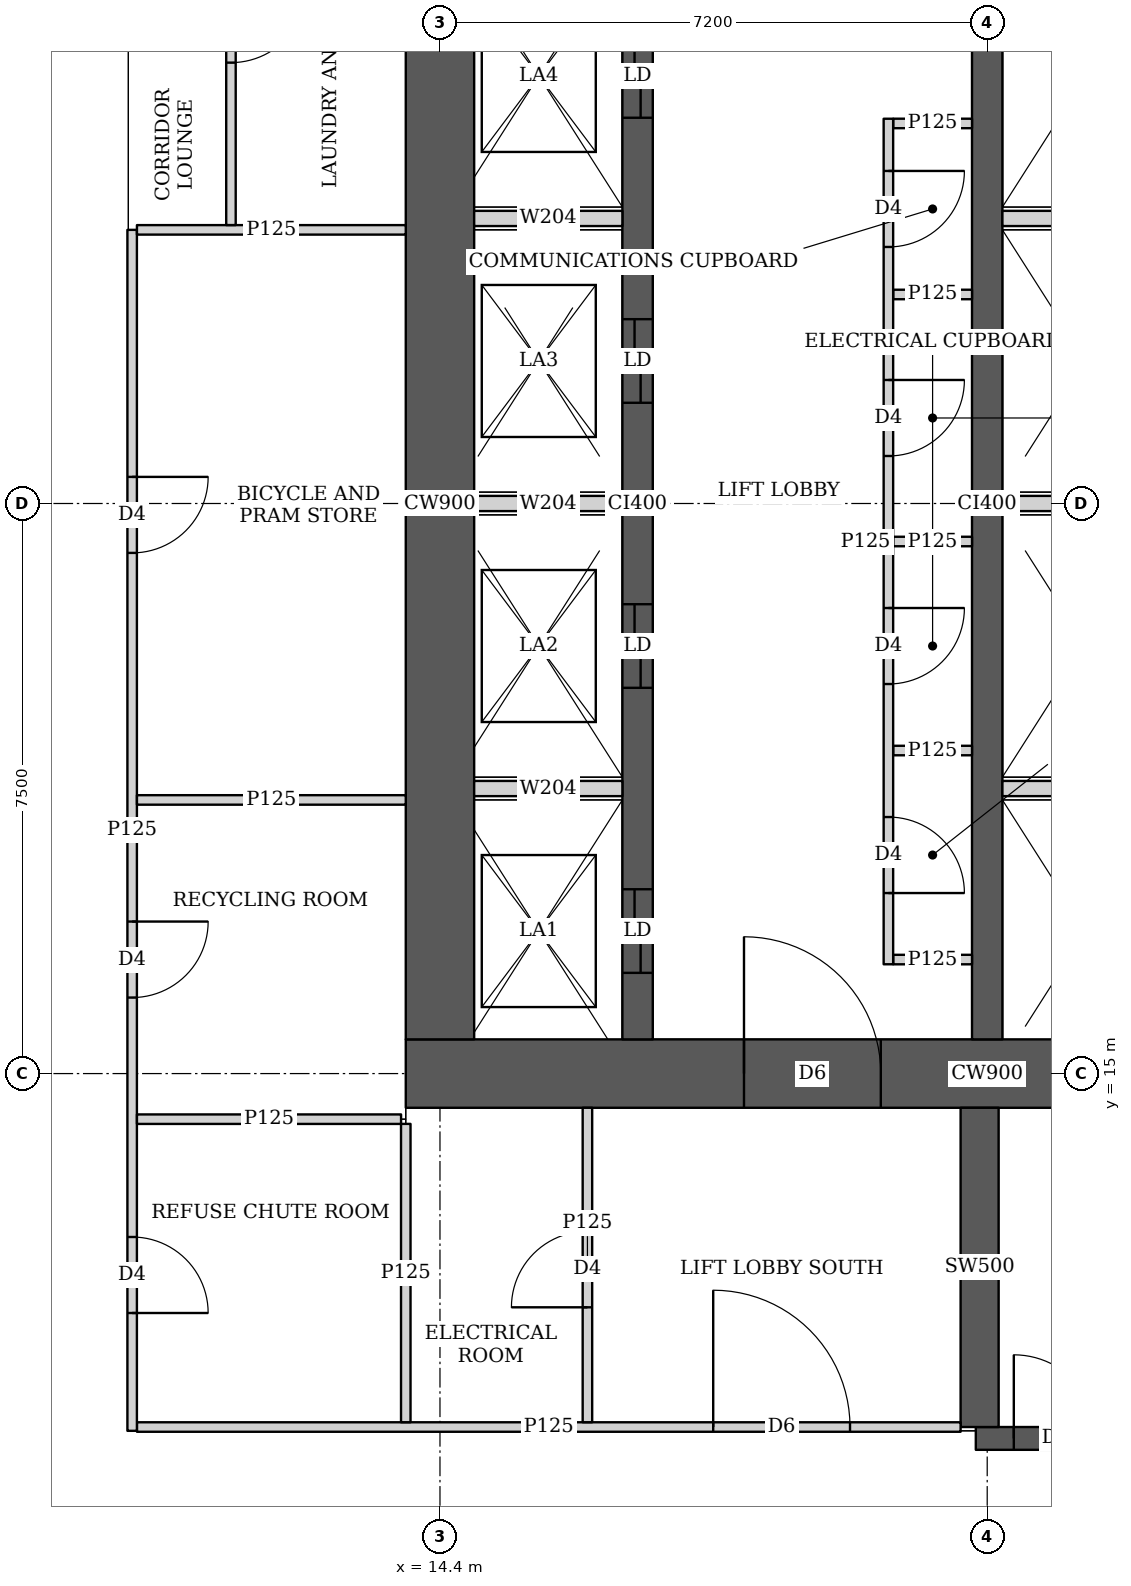
"""IFC4 building model, lengths in metres.
Left out: names, types, materials, properties, quantities, classifications, styles, units other than length and angle.
Written with IfcOpenShell. Run it as: python <this file> out.ifc"""

import sys

from ifc_helpers import new_model, si_unit, direction, frame, frame_2d, origin, place, context, subcontext, project, spatial, rectangle, extrude, element, fill, save


model = new_model("IFC4")
c1 = context("Model", 3, precision=1e-05, world=origin(), true_north=direction((0.0, 1.0)))
c2 = subcontext(c1, "Body", "Model", "MODEL_VIEW")
j1 = project(units=[si_unit("LENGTHUNIT", "METRE"), si_unit("PLANEANGLEUNIT", "RADIAN")], contexts=[c1])
p1 = place(None, origin())
s1 = spatial("IfcSite", under=j1, at=p1, CompositionType="ELEMENT")
p2 = place(p1, origin())
s2 = spatial("IfcBuilding", under=s1, at=p2, CompositionType="ELEMENT")
p3 = place(p2, frame((0.0, 0.0, 20.0)))
s3 = spatial("IfcBuildingStorey", under=s2, at=p3, CompositionType="ELEMENT", Elevation=20.0)
p4 = place(p3, frame((13.95, 15.0, 0.0), z_axis=(0.0, 0.0, 1.0), x_axis=(1.0, 0.0, 0.0)))
e1 = element("IfcWall", 1, at=p4, inside=s3, PredefinedType="SHEAR", context=c2, shape_type="SweptSolid", body=[
    extrude(rectangle(XDim=15.3, YDim=0.9, at=frame_2d((7.65, 0.0))), origin(), (0.0, 0.0, 1.0), 3.75),
])
p5 = place(p4, frame((4.45, 0.0, 0.0)))
e2 = element("IfcOpeningElement", 2, at=p5, cuts=e1, PredefinedType="OPENING", context=c2, shape_type="SweptSolid", body=[
    extrude(rectangle(XDim=1.8, YDim=2.1, at=frame_2d((0.9, 1.05))), frame((0.0, 0.46, 0.0), z_axis=(0.0, -1.0, 0.0), x_axis=(1.0, 0.0, 0.0)), (0.0, 0.0, 1.0), 0.92),
])
p6 = place(p4, frame((10.7, 0.0, 0.0)))
e3 = element("IfcOpeningElement", 3, at=p6, cuts=e1, PredefinedType="OPENING", context=c2, shape_type="SweptSolid", body=[
    extrude(rectangle(XDim=1.1, YDim=2.1, at=frame_2d((0.55, 1.05))), frame((0.0, 0.46, 0.0), z_axis=(0.0, -1.0, 0.0), x_axis=(1.0, 0.0, 0.0)), (0.0, 0.0, 1.0), 0.92),
])
p7 = place(p3, frame((14.4, 15.45, 0.0), z_axis=(0.0, 0.0, 1.0), x_axis=(0.0, 1.0, 0.0)))
e4 = element("IfcWall", 4, at=p7, inside=s3, PredefinedType="SHEAR", context=c2, shape_type="SweptSolid", body=[
    extrude(rectangle(XDim=14.1, YDim=0.9, at=frame_2d((7.05, 0.0))), origin(), (0.0, 0.0, 1.0), 3.75),
])
p8 = place(p3, frame((17.0, 15.45, 0.0), z_axis=(0.0, 0.0, 1.0), x_axis=(0.0, 1.0, 0.0)))
e5 = element("IfcWall", 5, at=p8, inside=s3, PredefinedType="SHEAR", context=c2, shape_type="SweptSolid", body=[
    extrude(rectangle(XDim=14.1, YDim=0.4, at=frame_2d((7.05, 0.0))), origin(), (0.0, 0.0, 1.0), 3.75),
])
p9 = place(p8, frame((0.875, 0.0, 0.0)))
e6 = element("IfcOpeningElement", 6, at=p9, cuts=e5, PredefinedType="OPENING", context=c2, shape_type="SweptSolid", body=[
    extrude(rectangle(XDim=1.1, YDim=2.1, at=frame_2d((0.55, 1.05))), frame((0.0, 0.21, 0.0), z_axis=(0.0, -1.0, 0.0), x_axis=(1.0, 0.0, 0.0)), (0.0, 0.0, 1.0), 0.42),
])
p10 = place(p8, frame((4.625, 0.0, 0.0)))
e7 = element("IfcOpeningElement", 7, at=p10, cuts=e5, PredefinedType="OPENING", context=c2, shape_type="SweptSolid", body=[
    extrude(rectangle(XDim=1.1, YDim=2.1, at=frame_2d((0.55, 1.05))), frame((0.0, 0.21, 0.0), z_axis=(0.0, -1.0, 0.0), x_axis=(1.0, 0.0, 0.0)), (0.0, 0.0, 1.0), 0.42),
])
p11 = place(p8, frame((8.375, 0.0, 0.0)))
e8 = element("IfcOpeningElement", 8, at=p11, cuts=e5, PredefinedType="OPENING", context=c2, shape_type="SweptSolid", body=[
    extrude(rectangle(XDim=1.1, YDim=2.1, at=frame_2d((0.55, 1.05))), frame((0.0, 0.21, 0.0), z_axis=(0.0, -1.0, 0.0), x_axis=(1.0, 0.0, 0.0)), (0.0, 0.0, 1.0), 0.42),
])
p12 = place(p8, frame((12.125, 0.0, 0.0)))
e9 = element("IfcOpeningElement", 9, at=p12, cuts=e5, PredefinedType="OPENING", context=c2, shape_type="SweptSolid", body=[
    extrude(rectangle(XDim=1.1, YDim=2.1, at=frame_2d((0.55, 1.05))), frame((0.0, 0.21, 0.0), z_axis=(0.0, -1.0, 0.0), x_axis=(1.0, 0.0, 0.0)), (0.0, 0.0, 1.0), 0.42),
])
p13 = place(p3, frame((21.6, 15.45, 0.0), z_axis=(0.0, 0.0, 1.0), x_axis=(0.0, 1.0, 0.0)))
e10 = element("IfcWall", 10, at=p13, inside=s3, PredefinedType="SHEAR", context=c2, shape_type="SweptSolid", body=[
    extrude(rectangle(XDim=14.1, YDim=0.4, at=frame_2d((7.05, 0.0))), origin(), (0.0, 0.0, 1.0), 3.75),
])
p14 = place(p3, frame((21.45, 10.2, 0.0), z_axis=(0.0, 0.0, 1.0), x_axis=(1.0, 0.0, 0.0)))
e11 = element("IfcWall", 11, at=p14, inside=s3, PredefinedType="SHEAR", context=c2, shape_type="SweptSolid", body=[
    extrude(rectangle(XDim=7.5, YDim=0.3, at=frame_2d((3.75, 0.0))), origin(), (0.0, 0.0, 1.0), 3.75),
])
p15 = place(p14, frame((0.5, 0.0, 0.0)))
e12 = element("IfcOpeningElement", 12, at=p15, cuts=e11, PredefinedType="OPENING", context=c2, shape_type="SweptSolid", body=[
    extrude(rectangle(XDim=1.1, YDim=2.1, at=frame_2d((0.55, 1.05))), frame((0.0, 0.16, 0.0), z_axis=(0.0, -1.0, 0.0), x_axis=(1.0, 0.0, 0.0)), (0.0, 0.0, 1.0), 0.32),
])
p16 = place(p3, frame((21.5, 10.35, 0.0), z_axis=(0.0, 0.0, 1.0), x_axis=(0.0, 1.0, 0.0)))
e13 = element("IfcWall", 13, at=p16, inside=s3, PredefinedType="SHEAR", context=c2, shape_type="SweptSolid", body=[
    extrude(rectangle(XDim=4.2, YDim=0.5, at=frame_2d((2.1, 0.0))), origin(), (0.0, 0.0, 1.0), 3.75),
])
p17 = place(p3, frame((10.35, 10.3, 0.0), z_axis=(0.0, 0.0, 1.0), x_axis=(0.0, 1.0, 0.0)))
e14 = element("IfcWall", 14, at=p17, inside=s3, PredefinedType="PARTITIONING", context=c2, shape_type="SweptSolid", body=[
    extrude(rectangle(XDim=15.8, YDim=0.125, at=frame_2d((7.9, 0.0))), origin(), (0.0, 0.0, 1.0), 3.5),
])
p18 = place(p17, frame((1.55, 0.0, 0.0)))
e15 = element("IfcOpeningElement", 15, at=p18, cuts=e14, PredefinedType="OPENING", context=c2, shape_type="SweptSolid", body=[
    extrude(rectangle(XDim=1.0, YDim=2.1, at=frame_2d((0.5, 1.05))), frame((0.0, 0.073, 0.0), z_axis=(0.0, -1.0, 0.0), x_axis=(1.0, 0.0, 0.0)), (0.0, 0.0, 1.0), 0.145),
])
p19 = place(p17, frame((5.7, 0.0, 0.0)))
e16 = element("IfcOpeningElement", 16, at=p19, cuts=e14, PredefinedType="OPENING", context=c2, shape_type="SweptSolid", body=[
    extrude(rectangle(XDim=1.0, YDim=2.1, at=frame_2d((0.5, 1.05))), frame((0.0, 0.073, 0.0), z_axis=(0.0, -1.0, 0.0), x_axis=(1.0, 0.0, 0.0)), (0.0, 0.0, 1.0), 0.145),
])
p20 = place(p17, frame((11.55, 0.0, 0.0)))
e17 = element("IfcOpeningElement", 17, at=p20, cuts=e14, PredefinedType="OPENING", context=c2, shape_type="SweptSolid", body=[
    extrude(rectangle(XDim=1.0, YDim=2.1, at=frame_2d((0.5, 1.05))), frame((0.0, 0.073, 0.0), z_axis=(0.0, -1.0, 0.0), x_axis=(1.0, 0.0, 0.0)), (0.0, 0.0, 1.0), 0.145),
])
p21 = place(p3, frame((11.65, 26.163, 0.0), z_axis=(0.0, 0.0, 1.0), x_axis=(0.0, 1.0, 0.0)))
e18 = element("IfcWall", 18, at=p21, inside=s3, PredefinedType="PARTITIONING", context=c2, shape_type="SweptSolid", body=[
    extrude(rectangle(XDim=5.275, YDim=0.125, at=frame_2d((2.637, 0.0))), origin(), (0.0, 0.0, 1.0), 3.5),
])
p22 = place(p21, frame((2.137, 0.0, 0.0)))
e19 = element("IfcOpeningElement", 19, at=p22, cuts=e18, PredefinedType="OPENING", context=c2, shape_type="SweptSolid", body=[
    extrude(rectangle(XDim=1.0, YDim=2.1, at=frame_2d((0.5, 1.05))), frame((0.0, 0.073, 0.0), z_axis=(0.0, -1.0, 0.0), x_axis=(1.0, 0.0, 0.0)), (0.0, 0.0, 1.0), 0.145),
])
p23 = place(p3, frame((10.413, 14.4, 0.0), z_axis=(0.0, 0.0, 1.0), x_axis=(1.0, 0.0, 0.0)))
e20 = element("IfcWall", 20, at=p23, inside=s3, PredefinedType="PARTITIONING", context=c2, shape_type="SweptSolid", body=[
    extrude(rectangle(XDim=3.475, YDim=0.125, at=frame_2d((1.737, 0.0))), origin(), (0.0, 0.0, 1.0), 3.5),
])
for number, where, z_axis, x_axis in (
    (21, (10.413, 18.6, 0.0), (0.0, 0.0, 1.0), (1.0, 0.0, 0.0)),
    (22, (10.413, 26.1, 0.0), (0.0, 0.0, 1.0), (1.0, 0.0, 0.0)),
):
    element("IfcWall", number, at=place(p3, frame(where, z_axis=z_axis, x_axis=x_axis)), inside=s3, PredefinedType="PARTITIONING", context=c2, shape_type="SweptSolid", body=[
        extrude(rectangle(XDim=3.537, YDim=0.125, at=frame_2d((1.769, 0.0))), origin(), (0.0, 0.0, 1.0), 3.5),
    ])
p24 = place(p3, frame((13.95, 10.413, 0.0), z_axis=(0.0, 0.0, 1.0), x_axis=(0.0, 1.0, 0.0)))
e23 = element("IfcWall", 23, at=p24, inside=s3, PredefinedType="PARTITIONING", context=c2, shape_type="SweptSolid", body=[
    extrude(rectangle(XDim=3.925, YDim=0.125, at=frame_2d((1.962, 0.0))), origin(), (0.0, 0.0, 1.0), 3.5),
])
p25 = place(p3, frame((10.413, 10.35, 0.0), z_axis=(0.0, 0.0, 1.0), x_axis=(1.0, 0.0, 0.0)))
e24 = element("IfcWall", 24, at=p25, inside=s3, PredefinedType="PARTITIONING", context=c2, shape_type="SweptSolid", body=[
    extrude(rectangle(XDim=10.837, YDim=0.125, at=frame_2d((5.418, 0.0))), origin(), (0.0, 0.0, 1.0), 3.5),
])
p26 = place(p25, frame((7.582, 0.0, 0.0)))
e25 = element("IfcOpeningElement", 25, at=p26, cuts=e24, PredefinedType="OPENING", context=c2, shape_type="SweptSolid", body=[
    extrude(rectangle(XDim=1.8, YDim=2.1, at=frame_2d((0.9, 1.05))), frame((0.0, 0.073, 0.0), z_axis=(0.0, -1.0, 0.0), x_axis=(1.0, 0.0, 0.0)), (0.0, 0.0, 1.0), 0.145),
])
p27 = place(p3, frame((16.34, 10.413, 0.0), z_axis=(0.0, 0.0, 1.0), x_axis=(0.0, 1.0, 0.0)))
e26 = element("IfcWall", 26, at=p27, inside=s3, PredefinedType="PARTITIONING", context=c2, shape_type="SweptSolid", body=[
    extrude(rectangle(XDim=4.137, YDim=0.125, at=frame_2d((2.068, 0.0))), origin(), (0.0, 0.0, 1.0), 3.5),
])
p28 = place(p27, frame((1.512, 0.0, 0.0)))
e27 = element("IfcOpeningElement", 27, at=p28, cuts=e26, PredefinedType="OPENING", context=c2, shape_type="SweptSolid", body=[
    extrude(rectangle(XDim=1.0, YDim=2.1, at=frame_2d((0.5, 1.05))), frame((0.0, 0.073, 0.0), z_axis=(0.0, -1.0, 0.0), x_axis=(1.0, 0.0, 0.0)), (0.0, 0.0, 1.0), 0.145),
])
p29 = place(p3, frame((20.3, 16.438, 0.0), z_axis=(0.0, 0.0, 1.0), x_axis=(0.0, 1.0, 0.0)))
e28 = element("IfcWall", 28, at=p29, inside=s3, PredefinedType="PARTITIONING", context=c2, shape_type="SweptSolid", body=[
    extrude(rectangle(XDim=11.124, YDim=0.125, at=frame_2d((5.562, 0.0))), origin(), (0.0, 0.0, 1.0), 3.5),
])
p30 = place(p29, frame((0.937, 0.0, 0.0)))
e29 = element("IfcOpeningElement", 29, at=p30, cuts=e28, PredefinedType="OPENING", context=c2, shape_type="SweptSolid", body=[
    extrude(rectangle(XDim=1.0, YDim=2.1, at=frame_2d((0.5, 1.05))), frame((0.0, 0.073, 0.0), z_axis=(0.0, -1.0, 0.0), x_axis=(1.0, 0.0, 0.0)), (0.0, 0.0, 1.0), 0.145),
])
p31 = place(p29, frame((3.687, 0.0, 0.0)))
e30 = element("IfcOpeningElement", 30, at=p31, cuts=e28, PredefinedType="OPENING", context=c2, shape_type="SweptSolid", body=[
    extrude(rectangle(XDim=1.0, YDim=2.1, at=frame_2d((0.5, 1.05))), frame((0.0, 0.073, 0.0), z_axis=(0.0, -1.0, 0.0), x_axis=(1.0, 0.0, 0.0)), (0.0, 0.0, 1.0), 0.145),
])
p32 = place(p29, frame((6.687, 0.0, 0.0)))
e31 = element("IfcOpeningElement", 31, at=p32, cuts=e28, PredefinedType="OPENING", context=c2, shape_type="SweptSolid", body=[
    extrude(rectangle(XDim=1.0, YDim=2.1, at=frame_2d((0.5, 1.05))), frame((0.0, 0.073, 0.0), z_axis=(0.0, -1.0, 0.0), x_axis=(1.0, 0.0, 0.0)), (0.0, 0.0, 1.0), 0.145),
])
p33 = place(p29, frame((9.437, 0.0, 0.0)))
e32 = element("IfcOpeningElement", 32, at=p33, cuts=e28, PredefinedType="OPENING", context=c2, shape_type="SweptSolid", body=[
    extrude(rectangle(XDim=1.0, YDim=2.1, at=frame_2d((0.5, 1.05))), frame((0.0, 0.073, 0.0), z_axis=(0.0, -1.0, 0.0), x_axis=(1.0, 0.0, 0.0)), (0.0, 0.0, 1.0), 0.145),
])
for number, where, z_axis, x_axis in (
    (33, (20.363, 16.5, 0.0), (0.0, 0.0, 1.0), (1.0, 0.0, 0.0)),
    (34, (20.363, 27.5, 0.0), (0.0, 0.0, 1.0), (1.0, 0.0, 0.0)),
    (35, (20.363, 19.25, 0.0), (0.0, 0.0, 1.0), (1.0, 0.0, 0.0)),
    (36, (20.363, 22.0, 0.0), (0.0, 0.0, 1.0), (1.0, 0.0, 0.0)),
    (37, (20.363, 25.25, 0.0), (0.0, 0.0, 1.0), (1.0, 0.0, 0.0)),
):
    element("IfcWall", number, at=place(p3, frame(where, z_axis=z_axis, x_axis=x_axis)), inside=s3, PredefinedType="PARTITIONING", context=c2, shape_type="SweptSolid", body=[
        extrude(rectangle(XDim=1.037, YDim=0.125, at=frame_2d((0.519, 0.0))), origin(), (0.0, 0.0, 1.0), 3.5),
    ])
p34 = place(p3, frame((14.85, 18.75, 0.0), z_axis=(0.0, 0.0, 1.0), x_axis=(1.0, 0.0, 0.0)))
e38 = element("IfcWall", 38, at=p34, inside=s3, PredefinedType="SOLIDWALL", context=c2, shape_type="SweptSolid", body=[
    extrude(rectangle(XDim=1.95, YDim=0.2, at=frame_2d((0.975, 0.0))), origin(), (0.0, 0.0, 1.0), 3.5),
])
p35 = place(p3, frame((21.8, 18.75, 0.0), z_axis=(0.0, 0.0, 1.0), x_axis=(1.0, 0.0, 0.0)))
e39 = element("IfcWall", 39, at=p35, inside=s3, PredefinedType="SOLIDWALL", context=c2, shape_type="SweptSolid", body=[
    extrude(rectangle(XDim=2.2, YDim=0.2, at=frame_2d((1.1, 0.0))), origin(), (0.0, 0.0, 1.0), 3.5),
])
p36 = place(p3, frame((14.85, 22.5, 0.0), z_axis=(0.0, 0.0, 1.0), x_axis=(1.0, 0.0, 0.0)))
e40 = element("IfcWall", 40, at=p36, inside=s3, PredefinedType="SOLIDWALL", context=c2, shape_type="SweptSolid", body=[
    extrude(rectangle(XDim=1.95, YDim=0.2, at=frame_2d((0.975, 0.0))), origin(), (0.0, 0.0, 1.0), 3.5),
])
p37 = place(p3, frame((21.8, 22.5, 0.0), z_axis=(0.0, 0.0, 1.0), x_axis=(1.0, 0.0, 0.0)))
e41 = element("IfcWall", 41, at=p37, inside=s3, PredefinedType="SOLIDWALL", context=c2, shape_type="SweptSolid", body=[
    extrude(rectangle(XDim=2.2, YDim=0.2, at=frame_2d((1.1, 0.0))), origin(), (0.0, 0.0, 1.0), 3.5),
])
p38 = place(p3, frame((14.85, 26.25, 0.0), z_axis=(0.0, 0.0, 1.0), x_axis=(1.0, 0.0, 0.0)))
e42 = element("IfcWall", 42, at=p38, inside=s3, PredefinedType="SOLIDWALL", context=c2, shape_type="SweptSolid", body=[
    extrude(rectangle(XDim=1.95, YDim=0.2, at=frame_2d((0.975, 0.0))), origin(), (0.0, 0.0, 1.0), 3.5),
])
p39 = place(p3, frame((21.8, 26.25, 0.0), z_axis=(0.0, 0.0, 1.0), x_axis=(1.0, 0.0, 0.0)))
e43 = element("IfcWall", 43, at=p39, inside=s3, PredefinedType="SOLIDWALL", context=c2, shape_type="SweptSolid", body=[
    extrude(rectangle(XDim=2.2, YDim=0.2, at=frame_2d((1.1, 0.0))), origin(), (0.0, 0.0, 1.0), 3.5),
])
p40 = place(p18, origin())
e44 = element("IfcDoor", 44, at=p40, inside=s3, OperationType="SINGLE_SWING_RIGHT", PredefinedType="DOOR", context=c2, shape_type="SweptSolid", body=[
    extrude(rectangle(XDim=1.0, YDim=2.1, at=frame_2d((0.5, 1.05))), frame((0.0, 0.025, 0.0), z_axis=(0.0, -1.0, 0.0), x_axis=(1.0, 0.0, 0.0)), (0.0, 0.0, 1.0), 0.05),
])
fill(e15, e44)
p41 = place(p19, origin())
e45 = element("IfcDoor", 45, at=p41, inside=s3, OperationType="SINGLE_SWING_LEFT", PredefinedType="DOOR", context=c2, shape_type="SweptSolid", body=[
    extrude(rectangle(XDim=1.0, YDim=2.1, at=frame_2d((0.5, 1.05))), frame((0.0, 0.025, 0.0), z_axis=(0.0, -1.0, 0.0), x_axis=(1.0, 0.0, 0.0)), (0.0, 0.0, 1.0), 0.05),
])
fill(e16, e45)
p42 = place(p20, origin())
e46 = element("IfcDoor", 46, at=p42, inside=s3, OperationType="SINGLE_SWING_LEFT", PredefinedType="DOOR", context=c2, shape_type="SweptSolid", body=[
    extrude(rectangle(XDim=1.0, YDim=2.1, at=frame_2d((0.5, 1.05))), frame((0.0, 0.025, 0.0), z_axis=(0.0, -1.0, 0.0), x_axis=(1.0, 0.0, 0.0)), (0.0, 0.0, 1.0), 0.05),
])
fill(e17, e46)
p43 = place(p22, origin())
e47 = element("IfcDoor", 47, at=p43, inside=s3, OperationType="SINGLE_SWING_LEFT", PredefinedType="DOOR", context=c2, shape_type="SweptSolid", body=[
    extrude(rectangle(XDim=1.0, YDim=2.1, at=frame_2d((0.5, 1.05))), frame((0.0, 0.025, 0.0), z_axis=(0.0, -1.0, 0.0), x_axis=(1.0, 0.0, 0.0)), (0.0, 0.0, 1.0), 0.05),
])
fill(e19, e47)
p44 = place(p28, origin())
e48 = element("IfcDoor", 48, at=p44, inside=s3, OperationType="SINGLE_SWING_LEFT", PredefinedType="DOOR", context=c2, shape_type="SweptSolid", body=[
    extrude(rectangle(XDim=1.0, YDim=2.1, at=frame_2d((0.5, 1.05))), frame((0.0, 0.025, 0.0), z_axis=(0.0, -1.0, 0.0), x_axis=(1.0, 0.0, 0.0)), (0.0, 0.0, 1.0), 0.05),
])
fill(e27, e48)
p45 = place(p26, origin())
e49 = element("IfcDoor", 49, at=p45, inside=s3, OperationType="DOUBLE_DOOR_SINGLE_SWING", PredefinedType="DOOR", context=c2, shape_type="SweptSolid", body=[
    extrude(rectangle(XDim=1.8, YDim=2.1, at=frame_2d((0.9, 1.05))), frame((0.0, 0.025, 0.0), z_axis=(0.0, -1.0, 0.0), x_axis=(1.0, 0.0, 0.0)), (0.0, 0.0, 1.0), 0.05),
])
fill(e25, e49)
p46 = place(p30, origin())
e50 = element("IfcDoor", 50, at=p46, inside=s3, OperationType="SINGLE_SWING_RIGHT", PredefinedType="DOOR", context=c2, shape_type="SweptSolid", body=[
    extrude(rectangle(XDim=1.0, YDim=2.1, at=frame_2d((0.5, 1.05))), frame((0.0, 0.025, 0.0), z_axis=(0.0, -1.0, 0.0), x_axis=(1.0, 0.0, 0.0)), (0.0, 0.0, 1.0), 0.05),
])
fill(e29, e50)
p47 = place(p31, origin())
e51 = element("IfcDoor", 51, at=p47, inside=s3, OperationType="SINGLE_SWING_LEFT", PredefinedType="DOOR", context=c2, shape_type="SweptSolid", body=[
    extrude(rectangle(XDim=1.0, YDim=2.1, at=frame_2d((0.5, 1.05))), frame((0.0, 0.025, 0.0), z_axis=(0.0, -1.0, 0.0), x_axis=(1.0, 0.0, 0.0)), (0.0, 0.0, 1.0), 0.05),
])
fill(e30, e51)
p48 = place(p32, origin())
e52 = element("IfcDoor", 52, at=p48, inside=s3, OperationType="SINGLE_SWING_LEFT", PredefinedType="DOOR", context=c2, shape_type="SweptSolid", body=[
    extrude(rectangle(XDim=1.0, YDim=2.1, at=frame_2d((0.5, 1.05))), frame((0.0, 0.025, 0.0), z_axis=(0.0, -1.0, 0.0), x_axis=(1.0, 0.0, 0.0)), (0.0, 0.0, 1.0), 0.05),
])
fill(e31, e52)
p49 = place(p33, origin())
e53 = element("IfcDoor", 53, at=p49, inside=s3, OperationType="SINGLE_SWING_LEFT", PredefinedType="DOOR", context=c2, shape_type="SweptSolid", body=[
    extrude(rectangle(XDim=1.0, YDim=2.1, at=frame_2d((0.5, 1.05))), frame((0.0, 0.025, 0.0), z_axis=(0.0, -1.0, 0.0), x_axis=(1.0, 0.0, 0.0)), (0.0, 0.0, 1.0), 0.05),
])
fill(e32, e53)
p50 = place(p5, origin())
e54 = element("IfcDoor", 54, at=p50, inside=s3, OperationType="DOUBLE_DOOR_SINGLE_SWING", PredefinedType="DOOR", context=c2, shape_type="SweptSolid", body=[
    extrude(rectangle(XDim=1.8, YDim=2.1, at=frame_2d((0.9, 1.05))), frame((0.0, 0.025, 0.0), z_axis=(0.0, -1.0, 0.0), x_axis=(1.0, 0.0, 0.0)), (0.0, 0.0, 1.0), 0.05),
])
fill(e2, e54)
p51 = place(p9, origin())
e55 = element("IfcDoor", 55, at=p51, inside=s3, OperationType="DOUBLE_DOOR_SLIDING", PredefinedType="DOOR", context=c2, shape_type="SweptSolid", body=[
    extrude(rectangle(XDim=1.1, YDim=2.1, at=frame_2d((0.55, 1.05))), frame((0.0, 0.025, 0.0), z_axis=(0.0, -1.0, 0.0), x_axis=(1.0, 0.0, 0.0)), (0.0, 0.0, 1.0), 0.05),
])
fill(e6, e55)
p52 = place(p10, origin())
e56 = element("IfcDoor", 56, at=p52, inside=s3, OperationType="DOUBLE_DOOR_SLIDING", PredefinedType="DOOR", context=c2, shape_type="SweptSolid", body=[
    extrude(rectangle(XDim=1.1, YDim=2.1, at=frame_2d((0.55, 1.05))), frame((0.0, 0.025, 0.0), z_axis=(0.0, -1.0, 0.0), x_axis=(1.0, 0.0, 0.0)), (0.0, 0.0, 1.0), 0.05),
])
fill(e7, e56)
p53 = place(p11, origin())
e57 = element("IfcDoor", 57, at=p53, inside=s3, OperationType="DOUBLE_DOOR_SLIDING", PredefinedType="DOOR", context=c2, shape_type="SweptSolid", body=[
    extrude(rectangle(XDim=1.1, YDim=2.1, at=frame_2d((0.55, 1.05))), frame((0.0, 0.025, 0.0), z_axis=(0.0, -1.0, 0.0), x_axis=(1.0, 0.0, 0.0)), (0.0, 0.0, 1.0), 0.05),
])
fill(e8, e57)
p54 = place(p12, origin())
e58 = element("IfcDoor", 58, at=p54, inside=s3, OperationType="DOUBLE_DOOR_SLIDING", PredefinedType="DOOR", context=c2, shape_type="SweptSolid", body=[
    extrude(rectangle(XDim=1.1, YDim=2.1, at=frame_2d((0.55, 1.05))), frame((0.0, 0.025, 0.0), z_axis=(0.0, -1.0, 0.0), x_axis=(1.0, 0.0, 0.0)), (0.0, 0.0, 1.0), 0.05),
])
fill(e9, e58)
p55 = place(p15, origin())
e59 = element("IfcDoor", 59, at=p55, inside=s3, OperationType="SINGLE_SWING_LEFT", PredefinedType="DOOR", context=c2, shape_type="SweptSolid", body=[
    extrude(rectangle(XDim=1.1, YDim=2.1, at=frame_2d((0.55, 1.05))), frame((0.0, 0.025, 0.0), z_axis=(0.0, -1.0, 0.0), x_axis=(1.0, 0.0, 0.0)), (0.0, 0.0, 1.0), 0.05),
])
fill(e12, e59)
save(model, sys.argv[1])
